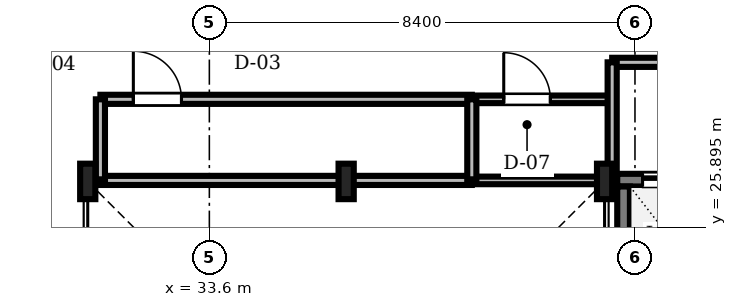
"""IFC4 building model, lengths in metres.
Left out: names, types, materials, properties, quantities, classifications, styles, units other than length and angle.
Written with IfcOpenShell. Run it as: python <this file> out.ifc"""

import sys

from ifc_helpers import new_model, si_unit, direction, frame, frame_2d, origin, origin_2d, place, context, subcontext, project, spatial, rectangle, i_section, extrude, source, transform, mapped, element, fill, save


model = new_model("IFC4")
c1 = context("Model", 3, precision=1e-05, world=origin(), true_north=direction((0.0, 1.0)))
c2 = subcontext(c1, "Body", "Model", "MODEL_VIEW")
j1 = project(units=[si_unit("LENGTHUNIT", "METRE"), si_unit("PLANEANGLEUNIT", "RADIAN")], contexts=[c1])
p1 = place(None, origin())
s1 = spatial("IfcSite", under=j1, at=p1, CompositionType="ELEMENT")
p2 = place(p1, origin())
s2 = spatial("IfcBuilding", under=s1, at=p2, CompositionType="ELEMENT")
p3 = place(p2, frame((0.0, 0.0, 211.05)))
s3 = spatial("IfcBuildingStorey", under=s2, at=p3, CompositionType="ELEMENT", Elevation=211.05)
m1 = source(origin(), c2, "Body", "SweptSolid", [
    extrude(i_section(OverallWidth=0.3, OverallDepth=0.7, WebThickness=0.017, FlangeThickness=0.032, FilletRadius=0.027, at=origin_2d()), origin(), (0.0, 0.0, 1.0), 3.53),
])
for number, where, z_axis, x_axis in (
    (1, (41.4, 26.8, 0.0), (0.0, 0.0, 1.0), (1.0, 0.0, 0.0)),
    (2, (36.3, 26.8, 0.0), (0.0, 0.0, 1.0), (1.0, 0.0, 0.0)),
    (3, (31.2, 26.8, 0.0), (0.0, 0.0, 1.0), (1.0, 0.0, 0.0)),
):
    element("IfcColumn", number, at=place(p3, frame(where, z_axis=z_axis, x_axis=x_axis)), inside=s3, PredefinedType="COLUMN", context=c2, shape_type="MappedRepresentation", body=[
        mapped(m1, transform((0.0, 0.0, 0.0), scale=1.0)),
    ])
m2 = source(origin(), c2, "Body", "SweptSolid", [
    extrude(rectangle(XDim=2.3, YDim=0.25, at=frame_2d((1.15, 0.0))), origin(), (0.0, 0.0, 1.0), 3.53),
])
p4 = place(p3, frame((41.65, 26.825, 0.0), z_axis=(0.0, 0.0, 1.0), x_axis=(1.0, 0.0, 0.0)))
e4 = element("IfcWall", 4, at=p4, inside=s3, PredefinedType="SOLIDWALL", context=c2, shape_type="MappedRepresentation", body=[
    mapped(m2, transform((0.0, 0.0, 0.0), scale=1.0)),
])
m3 = source(origin(), c2, "Body", "SweptSolid", [
    extrude(rectangle(XDim=1.3, YDim=2.3, at=frame_2d((0.65, 1.15))), frame((0.0, 0.135, 0.0), z_axis=(0.0, -1.0, 0.0), x_axis=(1.0, 0.0, 0.0)), (0.0, 0.0, 1.0), 0.27),
])
p5 = place(p4, frame((0.5, 0.0, 0.0)))
e5 = element("IfcOpeningElement", 5, at=p5, cuts=e4, PredefinedType="OPENING", context=c2, shape_type="MappedRepresentation", body=[
    mapped(m3, transform((0.0, 0.0, 0.0), scale=1.0)),
])
p6 = place(p3, frame((41.775, 24.4, 0.0), z_axis=(0.0, 0.0, 1.0), x_axis=(0.0, 1.0, 0.0)))
e6 = element("IfcWall", 6, at=p6, inside=s3, PredefinedType="SOLIDWALL", context=c2, shape_type="MappedRepresentation", body=[
    mapped(m2, transform((0.0, 0.0, 0.0), scale=1.0)),
])
m4 = source(origin(), c2, "Body", "SweptSolid", [
    extrude(rectangle(XDim=7.33, YDim=0.18, at=frame_2d((3.665, 0.0))), origin(), (0.0, 0.0, 1.0), 3.162),
])
p7 = place(p3, frame((31.45, 28.42, 0.0), z_axis=(0.0, 0.0, 1.0), x_axis=(1.0, 0.0, 0.0)))
e7 = element("IfcWall", 7, at=p7, inside=s3, PredefinedType="PARTITIONING", context=c2, shape_type="MappedRepresentation", body=[
    mapped(m4, transform((0.0, 0.0, 0.0), scale=1.0)),
])
m5 = source(origin(), c2, "Body", "SweptSolid", [
    extrude(rectangle(XDim=0.95, YDim=2.15, at=frame_2d((0.475, 1.075))), frame((0.0, 0.1, 0.0), z_axis=(0.0, -1.0, 0.0), x_axis=(1.0, 0.0, 0.0)), (0.0, 0.0, 1.0), 0.2),
])
p8 = place(p7, frame((0.65, 0.0, 0.0)))
e8 = element("IfcOpeningElement", 8, at=p8, cuts=e7, PredefinedType="OPENING", context=c2, shape_type="MappedRepresentation", body=[
    mapped(m5, transform((0.0, 0.0, 0.0), scale=1.0)),
])
m6 = source(origin(), c2, "Body", "SweptSolid", [
    extrude(rectangle(XDim=4.548, YDim=0.18, at=frame_2d((2.274, 0.0))), origin(), (0.0, 0.0, 1.0), 3.162),
])
p9 = place(p3, frame((41.55, 29.15, 0.0), z_axis=(0.0, 0.0, 1.0), x_axis=(1.0, 0.0, 0.0)))
e9 = element("IfcWall", 9, at=p9, inside=s3, PredefinedType="PARTITIONING", context=c2, shape_type="MappedRepresentation", body=[
    mapped(m6, transform((0.0, 0.0, 0.0), scale=1.0)),
])
m7 = source(origin(), c2, "Body", "SweptSolid", [
    extrude(rectangle(XDim=1.2, YDim=2.2, at=frame_2d((0.6, 1.1))), frame((0.0, 0.1, 0.0), z_axis=(0.0, -1.0, 0.0), x_axis=(1.0, 0.0, 0.0)), (0.0, 0.0, 1.0), 0.2),
])
p10 = place(p9, frame((1.6, 0.0, 0.0)))
e10 = element("IfcOpeningElement", 10, at=p10, cuts=e9, PredefinedType="OPENING", context=c2, shape_type="MappedRepresentation", body=[
    mapped(m7, transform((0.0, 0.0, 0.0), scale=1.0)),
])
m8 = source(origin(), c2, "Body", "SweptSolid", [
    extrude(rectangle(XDim=2.74, YDim=0.15, at=frame_2d((1.37, 0.0))), origin(), (0.0, 0.0, 1.0), 3.53),
])
p11 = place(p3, frame((38.78, 28.42, 0.0), z_axis=(0.0, 0.0, 1.0), x_axis=(1.0, 0.0, 0.0)))
e11 = element("IfcWall", 11, at=p11, inside=s3, PredefinedType="PARTITIONING", context=c2, shape_type="MappedRepresentation", body=[
    mapped(m8, transform((0.0, 0.0, 0.0), scale=1.0)),
])
m9 = source(origin(), c2, "Body", "SweptSolid", [
    extrude(rectangle(XDim=0.92, YDim=2.1, at=frame_2d((0.46, 1.05))), frame((0.0, 0.085, 0.0), z_axis=(0.0, -1.0, 0.0), x_axis=(1.0, 0.0, 0.0)), (0.0, 0.0, 1.0), 0.17),
])
p12 = place(p11, frame((0.63, 0.0, 0.0)))
e12 = element("IfcOpeningElement", 12, at=p12, cuts=e11, PredefinedType="OPENING", context=c2, shape_type="MappedRepresentation", body=[
    mapped(m9, transform((0.0, 0.0, 0.0), scale=1.0)),
])
m10 = source(origin(), c2, "Body", "SweptSolid", [
    extrude(rectangle(XDim=7.33, YDim=0.18, at=frame_2d((3.665, 0.0))), origin(), (0.0, 0.0, 1.0), 3.072),
])
p13 = place(p3, frame((31.45, 26.82, 0.0), z_axis=(0.0, 0.0, 1.0), x_axis=(1.0, 0.0, 0.0)))
e13 = element("IfcWall", 13, at=p13, inside=s3, PredefinedType="PARTITIONING", context=c2, shape_type="MappedRepresentation", body=[
    mapped(m10, transform((0.0, 0.0, 0.0), scale=1.0)),
])
m11 = source(origin(), c2, "Body", "SweptSolid", [
    extrude(rectangle(XDim=2.74, YDim=0.15, at=frame_2d((1.37, 0.0))), origin(), (0.0, 0.0, 1.0), 2.972),
])
p14 = place(p3, frame((38.78, 26.82, 0.0), z_axis=(0.0, 0.0, 1.0), x_axis=(1.0, 0.0, 0.0)))
e14 = element("IfcWall", 14, at=p14, inside=s3, PredefinedType="PARTITIONING", context=c2, shape_type="MappedRepresentation", body=[
    mapped(m11, transform((0.0, 0.0, 0.0), scale=1.0)),
])
m12 = source(origin(), c2, "Body", "SweptSolid", [
    extrude(rectangle(XDim=2.35, YDim=0.18, at=frame_2d((1.175, 0.0))), origin(), (0.0, 0.0, 1.0), 2.972),
])
p15 = place(p3, frame((41.55, 26.8, 0.0), z_axis=(0.0, 0.0, 1.0), x_axis=(0.0, 1.0, 0.0)))
e15 = element("IfcWall", 15, at=p15, inside=s3, PredefinedType="PARTITIONING", context=c2, shape_type="MappedRepresentation", body=[
    mapped(m12, transform((0.0, 0.0, 0.0), scale=1.0)),
])
m13 = source(origin(), c2, "Body", "SweptSolid", [
    extrude(rectangle(XDim=1.6, YDim=0.18, at=frame_2d((0.8, 0.0))), origin(), (0.0, 0.0, 1.0), 3.072),
])
for number, where, z_axis, x_axis in (
    (16, (31.45, 26.82, 0.0), (0.0, 0.0, 1.0), (0.0, 1.0, 0.0)),
    (17, (38.78, 26.82, 0.0), (0.0, 0.0, 1.0), (0.0, 1.0, 0.0)),
):
    element("IfcWall", number, at=place(p3, frame(where, z_axis=z_axis, x_axis=x_axis)), inside=s3, PredefinedType="PARTITIONING", context=c2, shape_type="MappedRepresentation", body=[
        mapped(m13, transform((0.0, 0.0, 0.0), scale=1.0)),
    ])
m14 = source(origin(), c2, "Body", "SweptSolid", [
    extrude(rectangle(XDim=1.3, YDim=2.3, at=frame_2d((0.65, 1.15))), frame((0.0, 0.025, 0.0), z_axis=(0.0, -1.0, 0.0), x_axis=(1.0, 0.0, 0.0)), (0.0, 0.0, 1.0), 0.05),
])
p16 = place(p5, origin())
e18 = element("IfcDoor", 18, at=p16, inside=s3, OperationType="DOUBLE_DOOR_SLIDING", PredefinedType="DOOR", context=c2, shape_type="MappedRepresentation", body=[
    mapped(m14, transform((0.0, 0.0, 0.0), scale=1.0)),
])
fill(e5, e18)
m15 = source(origin(), c2, "Body", "SweptSolid", [
    extrude(rectangle(XDim=0.95, YDim=2.15, at=frame_2d((0.475, 1.075))), frame((0.0, 0.025, 0.0), z_axis=(0.0, -1.0, 0.0), x_axis=(1.0, 0.0, 0.0)), (0.0, 0.0, 1.0), 0.05),
])
p17 = place(p8, origin())
e19 = element("IfcDoor", 19, at=p17, inside=s3, OperationType="SINGLE_SWING_LEFT", PredefinedType="DOOR", context=c2, shape_type="MappedRepresentation", body=[
    mapped(m15, transform((0.0, 0.0, 0.0), scale=1.0)),
])
fill(e8, e19)
m16 = source(origin(), c2, "Body", "SweptSolid", [
    extrude(rectangle(XDim=0.92, YDim=2.1, at=frame_2d((0.46, 1.05))), frame((0.0, 0.025, 0.0), z_axis=(0.0, -1.0, 0.0), x_axis=(1.0, 0.0, 0.0)), (0.0, 0.0, 1.0), 0.05),
])
p18 = place(p12, origin())
e20 = element("IfcDoor", 20, at=p18, inside=s3, OperationType="SINGLE_SWING_LEFT", PredefinedType="DOOR", context=c2, shape_type="MappedRepresentation", body=[
    mapped(m16, transform((0.0, 0.0, 0.0), scale=1.0)),
])
fill(e12, e20)
save(model, sys.argv[1])
